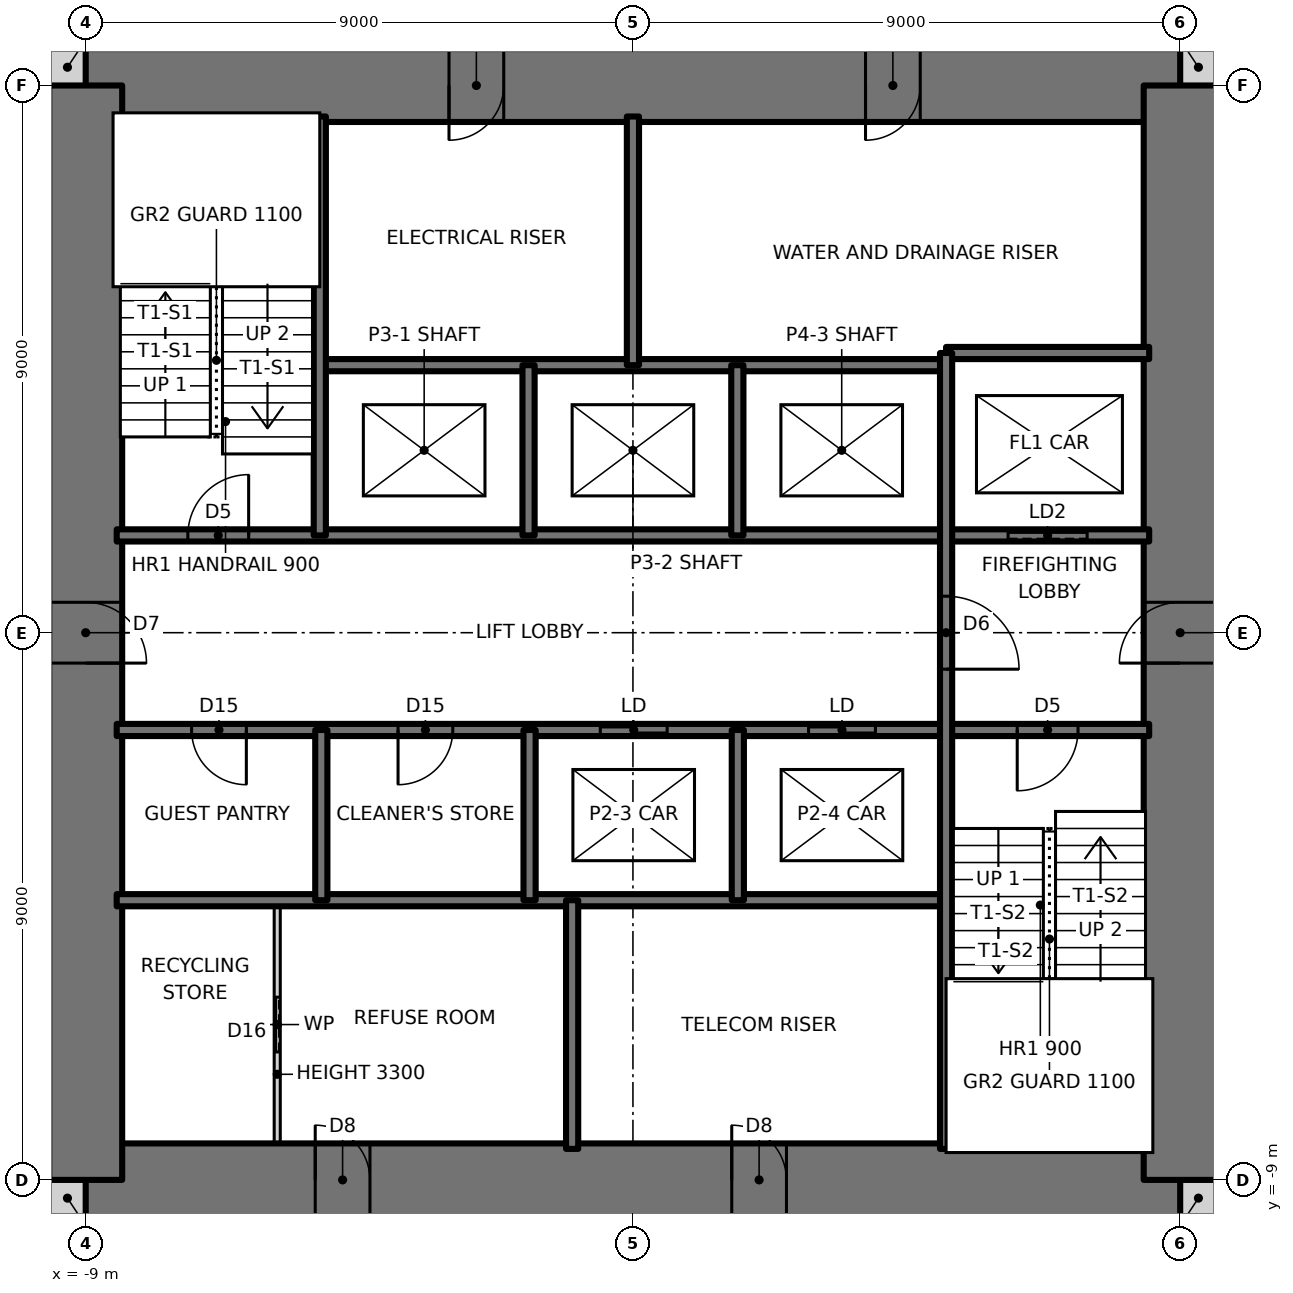
"""IFC4 building model, lengths in metres.
Left out: names, types, materials, properties, quantities, classifications, styles, units other than length and angle.
Written with IfcOpenShell. Run it as: python <this file> out.ifc"""

import sys

from ifc_helpers import new_model, si_unit, direction, frame, frame_2d, origin, place, context, subcontext, project, spatial, rectangle, extrude, element, fill, save


model = new_model("IFC4")
c1 = context("Model", 3, precision=1e-05, world=origin(), true_north=direction((0.0, 1.0)))
c2 = subcontext(c1, "Body", "Model", "MODEL_VIEW")
j1 = project(units=[si_unit("LENGTHUNIT", "METRE"), si_unit("PLANEANGLEUNIT", "RADIAN")], contexts=[c1])
p1 = place(None, origin())
s1 = spatial("IfcSite", under=j1, at=p1, CompositionType="ELEMENT")
p2 = place(p1, origin())
s2 = spatial("IfcBuilding", under=s1, at=p2, CompositionType="ELEMENT")
p3 = place(p2, frame((0.0, 0.0, 98.0)))
s3 = spatial("IfcBuildingStorey", under=s2, at=p3, CompositionType="ELEMENT", Elevation=98.0)
for number, where, z_axis, x_axis in (
    (1, (-9.6, -9.3, 0.0), (0.0, 0.0, 1.0), (1.0, 0.0, 0.0)),
    (2, (9.0, -9.3, 0.0), (0.0, 0.0, 1.0), (1.0, 0.0, 0.0)),
    (3, (9.0, 9.3, 0.0), (0.0, 0.0, 1.0), (1.0, 0.0, 0.0)),
    (4, (-9.6, 9.3, 0.0), (0.0, 0.0, 1.0), (1.0, 0.0, 0.0)),
):
    element("IfcWall", number, at=place(p3, frame(where, z_axis=z_axis, x_axis=x_axis)), inside=s3, PredefinedType="SOLIDWALL", context=c2, shape_type="SweptSolid", body=[
        extrude(rectangle(XDim=0.6, YDim=0.6, at=frame_2d((0.3, 0.0))), origin(), (0.0, 0.0, 1.0), 3.5),
    ])
p4 = place(p3, frame((-9.0, -9.0, 0.0), z_axis=(0.0, 0.0, 1.0), x_axis=(1.0, 0.0, 0.0)))
e5 = element("IfcWall", 5, at=p4, inside=s3, PredefinedType="SHEAR", context=c2, shape_type="SweptSolid", body=[
    extrude(rectangle(XDim=18.0, YDim=1.2, at=frame_2d((9.0, 0.0))), origin(), (0.0, 0.0, 1.0), 3.5),
])
p5 = place(p4, frame((3.775, 0.0, 0.0)))
e6 = element("IfcOpeningElement", 6, at=p5, cuts=e5, PredefinedType="OPENING", context=c2, shape_type="SweptSolid", body=[
    extrude(rectangle(XDim=0.9, YDim=2.1, at=frame_2d((0.45, 1.05))), frame((0.0, 0.61, 0.0), z_axis=(0.0, -1.0, 0.0), x_axis=(1.0, 0.0, 0.0)), (0.0, 0.0, 1.0), 1.22),
])
p6 = place(p4, frame((10.625, 0.0, 0.0)))
e7 = element("IfcOpeningElement", 7, at=p6, cuts=e5, PredefinedType="OPENING", context=c2, shape_type="SweptSolid", body=[
    extrude(rectangle(XDim=0.9, YDim=2.1, at=frame_2d((0.45, 1.05))), frame((0.0, 0.61, 0.0), z_axis=(0.0, -1.0, 0.0), x_axis=(1.0, 0.0, 0.0)), (0.0, 0.0, 1.0), 1.22),
])
p7 = place(p3, frame((9.0, 9.0, 0.0), z_axis=(0.0, 0.0, 1.0), x_axis=(-1.0, 0.0, 0.0)))
e8 = element("IfcWall", 8, at=p7, inside=s3, PredefinedType="SHEAR", context=c2, shape_type="SweptSolid", body=[
    extrude(rectangle(XDim=18.0, YDim=1.2, at=frame_2d((9.0, 0.0))), origin(), (0.0, 0.0, 1.0), 3.5),
])
p8 = place(p7, frame((11.125, 0.0, 0.0)))
e9 = element("IfcOpeningElement", 9, at=p8, cuts=e8, PredefinedType="OPENING", context=c2, shape_type="SweptSolid", body=[
    extrude(rectangle(XDim=0.9, YDim=2.1, at=frame_2d((0.45, 1.05))), frame((0.0, 0.61, 0.0), z_axis=(0.0, -1.0, 0.0), x_axis=(1.0, 0.0, 0.0)), (0.0, 0.0, 1.0), 1.22),
])
p9 = place(p7, frame((4.275, 0.0, 0.0)))
e10 = element("IfcOpeningElement", 10, at=p9, cuts=e8, PredefinedType="OPENING", context=c2, shape_type="SweptSolid", body=[
    extrude(rectangle(XDim=0.9, YDim=2.1, at=frame_2d((0.45, 1.05))), frame((0.0, 0.61, 0.0), z_axis=(0.0, -1.0, 0.0), x_axis=(1.0, 0.0, 0.0)), (0.0, 0.0, 1.0), 1.22),
])
p10 = place(p3, frame((9.0, -9.0, 0.0), z_axis=(0.0, 0.0, 1.0), x_axis=(0.0, 1.0, 0.0)))
e11 = element("IfcWall", 11, at=p10, inside=s3, PredefinedType="SHEAR", context=c2, shape_type="SweptSolid", body=[
    extrude(rectangle(XDim=18.0, YDim=1.2, at=frame_2d((9.0, 0.0))), origin(), (0.0, 0.0, 1.0), 3.5),
])
p11 = place(p10, frame((8.5, 0.0, 0.0)))
e12 = element("IfcOpeningElement", 12, at=p11, cuts=e11, PredefinedType="OPENING", context=c2, shape_type="SweptSolid", body=[
    extrude(rectangle(XDim=1.0, YDim=2.1, at=frame_2d((0.5, 1.05))), frame((0.0, 0.61, 0.0), z_axis=(0.0, -1.0, 0.0), x_axis=(1.0, 0.0, 0.0)), (0.0, 0.0, 1.0), 1.22),
])
p12 = place(p3, frame((-9.0, 9.0, 0.0), z_axis=(0.0, 0.0, 1.0), x_axis=(0.0, -1.0, 0.0)))
e13 = element("IfcWall", 13, at=p12, inside=s3, PredefinedType="SHEAR", context=c2, shape_type="SweptSolid", body=[
    extrude(rectangle(XDim=18.0, YDim=1.2, at=frame_2d((9.0, 0.0))), origin(), (0.0, 0.0, 1.0), 3.5),
])
p13 = place(p12, frame((8.5, 0.0, 0.0)))
e14 = element("IfcOpeningElement", 14, at=p13, cuts=e13, PredefinedType="OPENING", context=c2, shape_type="SweptSolid", body=[
    extrude(rectangle(XDim=1.0, YDim=2.1, at=frame_2d((0.5, 1.05))), frame((0.0, 0.61, 0.0), z_axis=(0.0, -1.0, 0.0), x_axis=(1.0, 0.0, 0.0)), (0.0, 0.0, 1.0), 1.22),
])
p14 = place(p3, frame((-8.49, -4.4, 0.0), z_axis=(0.0, 0.0, 1.0), x_axis=(1.0, 0.0, 0.0)))
e15 = element("IfcWall", 15, at=p14, inside=s3, PredefinedType="SOLIDWALL", context=c2, shape_type="SweptSolid", body=[
    extrude(rectangle(XDim=13.64, YDim=0.2, at=frame_2d((6.82, 0.0))), origin(), (0.0, 0.0, 1.0), 3.5),
])
p15 = place(p3, frame((-8.49, -1.6, 0.0), z_axis=(0.0, 0.0, 1.0), x_axis=(1.0, 0.0, 0.0)))
e16 = element("IfcWall", 16, at=p15, inside=s3, PredefinedType="SOLIDWALL", context=c2, shape_type="SweptSolid", body=[
    extrude(rectangle(XDim=16.98, YDim=0.2, at=frame_2d((8.49, 0.0))), origin(), (0.0, 0.0, 1.0), 3.5),
])
p16 = place(p15, frame((14.81, 0.0, 0.0)))
e17 = element("IfcOpeningElement", 17, at=p16, cuts=e16, PredefinedType="OPENING", context=c2, shape_type="SweptSolid", body=[
    extrude(rectangle(XDim=1.0, YDim=2.1, at=frame_2d((0.5, 1.05))), frame((0.0, 0.11, 0.0), z_axis=(0.0, -1.0, 0.0), x_axis=(1.0, 0.0, 0.0)), (0.0, 0.0, 1.0), 0.22),
])
p17 = place(p15, frame((1.232, 0.0, 0.0)))
e18 = element("IfcOpeningElement", 18, at=p17, cuts=e16, PredefinedType="OPENING", context=c2, shape_type="SweptSolid", body=[
    extrude(rectangle(XDim=0.9, YDim=2.1, at=frame_2d((0.45, 1.05))), frame((0.0, 0.11, 0.0), z_axis=(0.0, -1.0, 0.0), x_axis=(1.0, 0.0, 0.0)), (0.0, 0.0, 1.0), 0.22),
])
p18 = place(p15, frame((4.627, 0.0, 0.0)))
e19 = element("IfcOpeningElement", 19, at=p18, cuts=e16, PredefinedType="OPENING", context=c2, shape_type="SweptSolid", body=[
    extrude(rectangle(XDim=0.9, YDim=2.1, at=frame_2d((0.45, 1.05))), frame((0.0, 0.11, 0.0), z_axis=(0.0, -1.0, 0.0), x_axis=(1.0, 0.0, 0.0)), (0.0, 0.0, 1.0), 0.22),
])
p19 = place(p15, frame((7.953, 0.0, 0.0)))
e20 = element("IfcOpeningElement", 20, at=p19, cuts=e16, PredefinedType="OPENING", context=c2, shape_type="SweptSolid", body=[
    extrude(rectangle(XDim=1.1, YDim=2.1, at=frame_2d((0.55, 1.05))), frame((0.0, 0.11, 0.0), z_axis=(0.0, -1.0, 0.0), x_axis=(1.0, 0.0, 0.0)), (0.0, 0.0, 1.0), 0.22),
])
p20 = place(p15, frame((11.378, 0.0, 0.0)))
e21 = element("IfcOpeningElement", 21, at=p20, cuts=e16, PredefinedType="OPENING", context=c2, shape_type="SweptSolid", body=[
    extrude(rectangle(XDim=1.1, YDim=2.1, at=frame_2d((0.55, 1.05))), frame((0.0, 0.11, 0.0), z_axis=(0.0, -1.0, 0.0), x_axis=(1.0, 0.0, 0.0)), (0.0, 0.0, 1.0), 0.22),
])
p21 = place(p3, frame((-8.49, 1.6, 0.0), z_axis=(0.0, 0.0, 1.0), x_axis=(1.0, 0.0, 0.0)))
e22 = element("IfcWall", 22, at=p21, inside=s3, PredefinedType="SOLIDWALL", context=c2, shape_type="SweptSolid", body=[
    extrude(rectangle(XDim=16.98, YDim=0.2, at=frame_2d((8.49, 0.0))), origin(), (0.0, 0.0, 1.0), 3.5),
])
p22 = place(p21, frame((1.17, 0.0, 0.0)))
e23 = element("IfcOpeningElement", 23, at=p22, cuts=e22, PredefinedType="OPENING", context=c2, shape_type="SweptSolid", body=[
    extrude(rectangle(XDim=1.0, YDim=2.1, at=frame_2d((0.5, 1.05))), frame((0.0, 0.11, 0.0), z_axis=(0.0, -1.0, 0.0), x_axis=(1.0, 0.0, 0.0)), (0.0, 0.0, 1.0), 0.22),
])
p23 = place(p21, frame((14.66, 0.0, 0.0)))
e24 = element("IfcOpeningElement", 24, at=p23, cuts=e22, PredefinedType="OPENING", context=c2, shape_type="SweptSolid", body=[
    extrude(rectangle(XDim=1.3, YDim=2.1, at=frame_2d((0.65, 1.05))), frame((0.0, 0.11, 0.0), z_axis=(0.0, -1.0, 0.0), x_axis=(1.0, 0.0, 0.0)), (0.0, 0.0, 1.0), 0.22),
])
p24 = place(p3, frame((-5.15, 4.4, 0.0), z_axis=(0.0, 0.0, 1.0), x_axis=(1.0, 0.0, 0.0)))
e25 = element("IfcWall", 25, at=p24, inside=s3, PredefinedType="SOLIDWALL", context=c2, shape_type="SweptSolid", body=[
    extrude(rectangle(XDim=10.3, YDim=0.2, at=frame_2d((5.15, 0.0))), origin(), (0.0, 0.0, 1.0), 3.5),
])
p25 = place(p3, frame((5.15, 4.6, 0.0), z_axis=(0.0, 0.0, 1.0), x_axis=(1.0, 0.0, 0.0)))
e26 = element("IfcWall", 26, at=p25, inside=s3, PredefinedType="SOLIDWALL", context=c2, shape_type="SweptSolid", body=[
    extrude(rectangle(XDim=3.34, YDim=0.2, at=frame_2d((1.67, 0.0))), origin(), (0.0, 0.0, 1.0), 3.5),
])
p26 = place(p3, frame((5.15, -8.49, 0.0), z_axis=(0.0, 0.0, 1.0), x_axis=(0.0, 1.0, 0.0)))
e27 = element("IfcWall", 27, at=p26, inside=s3, PredefinedType="SOLIDWALL", context=c2, shape_type="SweptSolid", body=[
    extrude(rectangle(XDim=13.09, YDim=0.2, at=frame_2d((6.545, 0.0))), origin(), (0.0, 0.0, 1.0), 3.5),
])
p27 = place(p26, frame((7.89, 0.0, 0.0)))
e28 = element("IfcOpeningElement", 28, at=p27, cuts=e27, PredefinedType="OPENING", context=c2, shape_type="SweptSolid", body=[
    extrude(rectangle(XDim=1.2, YDim=2.1, at=frame_2d((0.6, 1.05))), frame((0.0, 0.11, 0.0), z_axis=(0.0, -1.0, 0.0), x_axis=(1.0, 0.0, 0.0)), (0.0, 0.0, 1.0), 0.22),
])
for number, where, z_axis, x_axis in (
    (29, (1.725, -4.4, 0.0), (0.0, 0.0, 1.0), (0.0, 1.0, 0.0)),
    (30, (1.717, 1.6, 0.0), (0.0, 0.0, 1.0), (0.0, 1.0, 0.0)),
):
    element("IfcWall", number, at=place(p3, frame(where, z_axis=z_axis, x_axis=x_axis)), inside=s3, PredefinedType="SOLIDWALL", context=c2, shape_type="SweptSolid", body=[
        extrude(rectangle(XDim=2.8, YDim=0.2, at=frame_2d((1.4, 0.0))), origin(), (0.0, 0.0, 1.0), 3.5),
    ])
for number, where, z_axis, x_axis in (
    (31, (0.0, 4.4, 0.0), (0.0, 0.0, 1.0), (0.0, 1.0, 0.0)),
    (32, (-1.0, -8.49, 0.0), (0.0, 0.0, 1.0), (0.0, 1.0, 0.0)),
):
    element("IfcWall", number, at=place(p3, frame(where, z_axis=z_axis, x_axis=x_axis)), inside=s3, PredefinedType="SOLIDWALL", context=c2, shape_type="SweptSolid", body=[
        extrude(rectangle(XDim=4.09, YDim=0.2, at=frame_2d((2.045, 0.0))), origin(), (0.0, 0.0, 1.0), 3.5),
    ])
for number, where, z_axis, x_axis in (
    (33, (-1.7, -4.4, 0.0), (0.0, 0.0, 1.0), (0.0, 1.0, 0.0)),
    (34, (-1.717, 1.6, 0.0), (0.0, 0.0, 1.0), (0.0, 1.0, 0.0)),
    (35, (-5.125, -4.4, 0.0), (0.0, 0.0, 1.0), (0.0, 1.0, 0.0)),
):
    element("IfcWall", number, at=place(p3, frame(where, z_axis=z_axis, x_axis=x_axis)), inside=s3, PredefinedType="SOLIDWALL", context=c2, shape_type="SweptSolid", body=[
        extrude(rectangle(XDim=2.8, YDim=0.2, at=frame_2d((1.4, 0.0))), origin(), (0.0, 0.0, 1.0), 3.5),
    ])
p28 = place(p3, frame((-5.15, 1.6, 0.0), z_axis=(0.0, 0.0, 1.0), x_axis=(0.0, 1.0, 0.0)))
e36 = element("IfcWall", 36, at=p28, inside=s3, PredefinedType="SOLIDWALL", context=c2, shape_type="SweptSolid", body=[
    extrude(rectangle(XDim=6.89, YDim=0.2, at=frame_2d((3.445, 0.0))), origin(), (0.0, 0.0, 1.0), 3.5),
])
p29 = place(p3, frame((-5.85, -8.49, 0.0), z_axis=(0.0, 0.0, 1.0), x_axis=(0.0, 1.0, 0.0)))
e37 = element("IfcWall", 37, at=p29, inside=s3, PredefinedType="PARTITIONING", context=c2, shape_type="SweptSolid", body=[
    extrude(rectangle(XDim=4.09, YDim=0.1, at=frame_2d((2.045, 0.0))), origin(), (0.0, 0.0, 1.0), 3.3),
])
p30 = place(p29, frame((1.595, 0.0, 0.0)))
e38 = element("IfcOpeningElement", 38, at=p30, cuts=e37, PredefinedType="OPENING", context=c2, shape_type="SweptSolid", body=[
    extrude(rectangle(XDim=0.9, YDim=2.1, at=frame_2d((0.45, 1.05))), frame((0.0, 0.06, 0.0), z_axis=(0.0, -1.0, 0.0), x_axis=(1.0, 0.0, 0.0)), (0.0, 0.0, 1.0), 0.12),
])
p31 = place(p22, origin())
e39 = element("IfcDoor", 39, at=p31, inside=s3, OperationType="SINGLE_SWING_RIGHT", PredefinedType="DOOR", context=c2, shape_type="SweptSolid", body=[
    extrude(rectangle(XDim=1.0, YDim=2.1, at=frame_2d((0.5, 1.05))), frame((0.0, 0.025, 0.0), z_axis=(0.0, -1.0, 0.0), x_axis=(1.0, 0.0, 0.0)), (0.0, 0.0, 1.0), 0.05),
])
fill(e23, e39)
p32 = place(p16, frame((1.0, 0.0, 0.0), z_axis=(0.0, 0.0, 1.0), x_axis=(-1.0, 0.0, 0.0)))
e40 = element("IfcDoor", 40, at=p32, inside=s3, OperationType="SINGLE_SWING_RIGHT", PredefinedType="DOOR", context=c2, shape_type="SweptSolid", body=[
    extrude(rectangle(XDim=1.0, YDim=2.1, at=frame_2d((0.5, 1.05))), frame((0.0, 0.025, 0.0), z_axis=(0.0, -1.0, 0.0), x_axis=(1.0, 0.0, 0.0)), (0.0, 0.0, 1.0), 0.05),
])
fill(e17, e40)
p33 = place(p27, frame((1.2, 0.0, 0.0), z_axis=(0.0, 0.0, 1.0), x_axis=(-1.0, 0.0, 0.0)))
e41 = element("IfcDoor", 41, at=p33, inside=s3, OperationType="SINGLE_SWING_RIGHT", PredefinedType="DOOR", context=c2, shape_type="SweptSolid", body=[
    extrude(rectangle(XDim=1.2, YDim=2.1, at=frame_2d((0.6, 1.05))), frame((0.0, 0.025, 0.0), z_axis=(0.0, -1.0, 0.0), x_axis=(1.0, 0.0, 0.0)), (0.0, 0.0, 1.0), 0.05),
])
fill(e28, e41)
p34 = place(p17, frame((0.9, 0.0, 0.0), z_axis=(0.0, 0.0, 1.0), x_axis=(-1.0, 0.0, 0.0)))
e42 = element("IfcDoor", 42, at=p34, inside=s3, OperationType="SINGLE_SWING_LEFT", PredefinedType="DOOR", context=c2, shape_type="SweptSolid", body=[
    extrude(rectangle(XDim=0.9, YDim=2.1, at=frame_2d((0.45, 1.05))), frame((0.0, 0.025, 0.0), z_axis=(0.0, -1.0, 0.0), x_axis=(1.0, 0.0, 0.0)), (0.0, 0.0, 1.0), 0.05),
])
fill(e18, e42)
p35 = place(p18, frame((0.9, 0.0, 0.0), z_axis=(0.0, 0.0, 1.0), x_axis=(-1.0, 0.0, 0.0)))
e43 = element("IfcDoor", 43, at=p35, inside=s3, OperationType="SINGLE_SWING_RIGHT", PredefinedType="DOOR", context=c2, shape_type="SweptSolid", body=[
    extrude(rectangle(XDim=0.9, YDim=2.1, at=frame_2d((0.45, 1.05))), frame((0.0, 0.025, 0.0), z_axis=(0.0, -1.0, 0.0), x_axis=(1.0, 0.0, 0.0)), (0.0, 0.0, 1.0), 0.05),
])
fill(e19, e43)
p36 = place(p30, origin())
e44 = element("IfcDoor", 44, at=p36, inside=s3, OperationType="SLIDING_TO_LEFT", PredefinedType="DOOR", context=c2, shape_type="SweptSolid", body=[
    extrude(rectangle(XDim=0.9, YDim=2.1, at=frame_2d((0.45, 1.05))), frame((0.0, 0.025, 0.0), z_axis=(0.0, -1.0, 0.0), x_axis=(1.0, 0.0, 0.0)), (0.0, 0.0, 1.0), 0.05),
])
fill(e38, e44)
p37 = place(p13, origin())
e45 = element("IfcDoor", 45, at=p37, inside=s3, OperationType="SINGLE_SWING_RIGHT", PredefinedType="DOOR", context=c2, shape_type="SweptSolid", body=[
    extrude(rectangle(XDim=1.0, YDim=2.1, at=frame_2d((0.5, 1.05))), frame((0.0, 0.025, 0.0), z_axis=(0.0, -1.0, 0.0), x_axis=(1.0, 0.0, 0.0)), (0.0, 0.0, 1.0), 0.05),
])
fill(e14, e45)
p38 = place(p11, origin())
e46 = element("IfcDoor", 46, at=p38, inside=s3, OperationType="SINGLE_SWING_LEFT", PredefinedType="DOOR", context=c2, shape_type="SweptSolid", body=[
    extrude(rectangle(XDim=1.0, YDim=2.1, at=frame_2d((0.5, 1.05))), frame((0.0, 0.025, 0.0), z_axis=(0.0, -1.0, 0.0), x_axis=(1.0, 0.0, 0.0)), (0.0, 0.0, 1.0), 0.05),
])
fill(e12, e46)
p39 = place(p8, origin())
e47 = element("IfcDoor", 47, at=p39, inside=s3, OperationType="SINGLE_SWING_RIGHT", PredefinedType="DOOR", context=c2, shape_type="SweptSolid", body=[
    extrude(rectangle(XDim=0.9, YDim=2.1, at=frame_2d((0.45, 1.05))), frame((0.0, 0.025, 0.0), z_axis=(0.0, -1.0, 0.0), x_axis=(1.0, 0.0, 0.0)), (0.0, 0.0, 1.0), 0.05),
])
fill(e9, e47)
p40 = place(p9, origin())
e48 = element("IfcDoor", 48, at=p40, inside=s3, OperationType="SINGLE_SWING_RIGHT", PredefinedType="DOOR", context=c2, shape_type="SweptSolid", body=[
    extrude(rectangle(XDim=0.9, YDim=2.1, at=frame_2d((0.45, 1.05))), frame((0.0, 0.025, 0.0), z_axis=(0.0, -1.0, 0.0), x_axis=(1.0, 0.0, 0.0)), (0.0, 0.0, 1.0), 0.05),
])
fill(e10, e48)
p41 = place(p5, origin())
e49 = element("IfcDoor", 49, at=p41, inside=s3, OperationType="SINGLE_SWING_LEFT", PredefinedType="DOOR", context=c2, shape_type="SweptSolid", body=[
    extrude(rectangle(XDim=0.9, YDim=2.1, at=frame_2d((0.45, 1.05))), frame((0.0, 0.025, 0.0), z_axis=(0.0, -1.0, 0.0), x_axis=(1.0, 0.0, 0.0)), (0.0, 0.0, 1.0), 0.05),
])
fill(e6, e49)
p42 = place(p6, origin())
e50 = element("IfcDoor", 50, at=p42, inside=s3, OperationType="SINGLE_SWING_LEFT", PredefinedType="DOOR", context=c2, shape_type="SweptSolid", body=[
    extrude(rectangle(XDim=0.9, YDim=2.1, at=frame_2d((0.45, 1.05))), frame((0.0, 0.025, 0.0), z_axis=(0.0, -1.0, 0.0), x_axis=(1.0, 0.0, 0.0)), (0.0, 0.0, 1.0), 0.05),
])
fill(e7, e50)
p43 = place(p19, origin())
e51 = element("IfcDoor", 51, at=p43, inside=s3, OperationType="DOUBLE_DOOR_SLIDING", PredefinedType="DOOR", context=c2, shape_type="SweptSolid", body=[
    extrude(rectangle(XDim=1.1, YDim=2.1, at=frame_2d((0.55, 1.05))), frame((0.0, 0.025, 0.0), z_axis=(0.0, -1.0, 0.0), x_axis=(1.0, 0.0, 0.0)), (0.0, 0.0, 1.0), 0.05),
])
fill(e20, e51)
p44 = place(p20, origin())
e52 = element("IfcDoor", 52, at=p44, inside=s3, OperationType="DOUBLE_DOOR_SLIDING", PredefinedType="DOOR", context=c2, shape_type="SweptSolid", body=[
    extrude(rectangle(XDim=1.1, YDim=2.1, at=frame_2d((0.55, 1.05))), frame((0.0, 0.025, 0.0), z_axis=(0.0, -1.0, 0.0), x_axis=(1.0, 0.0, 0.0)), (0.0, 0.0, 1.0), 0.05),
])
fill(e21, e52)
p45 = place(p23, origin())
e53 = element("IfcDoor", 53, at=p45, inside=s3, OperationType="SLIDING_TO_LEFT", PredefinedType="DOOR", context=c2, shape_type="SweptSolid", body=[
    extrude(rectangle(XDim=1.3, YDim=2.1, at=frame_2d((0.65, 1.05))), frame((0.0, 0.025, 0.0), z_axis=(0.0, -1.0, 0.0), x_axis=(1.0, 0.0, 0.0)), (0.0, 0.0, 1.0), 0.05),
])
fill(e24, e53)
save(model, sys.argv[1])
